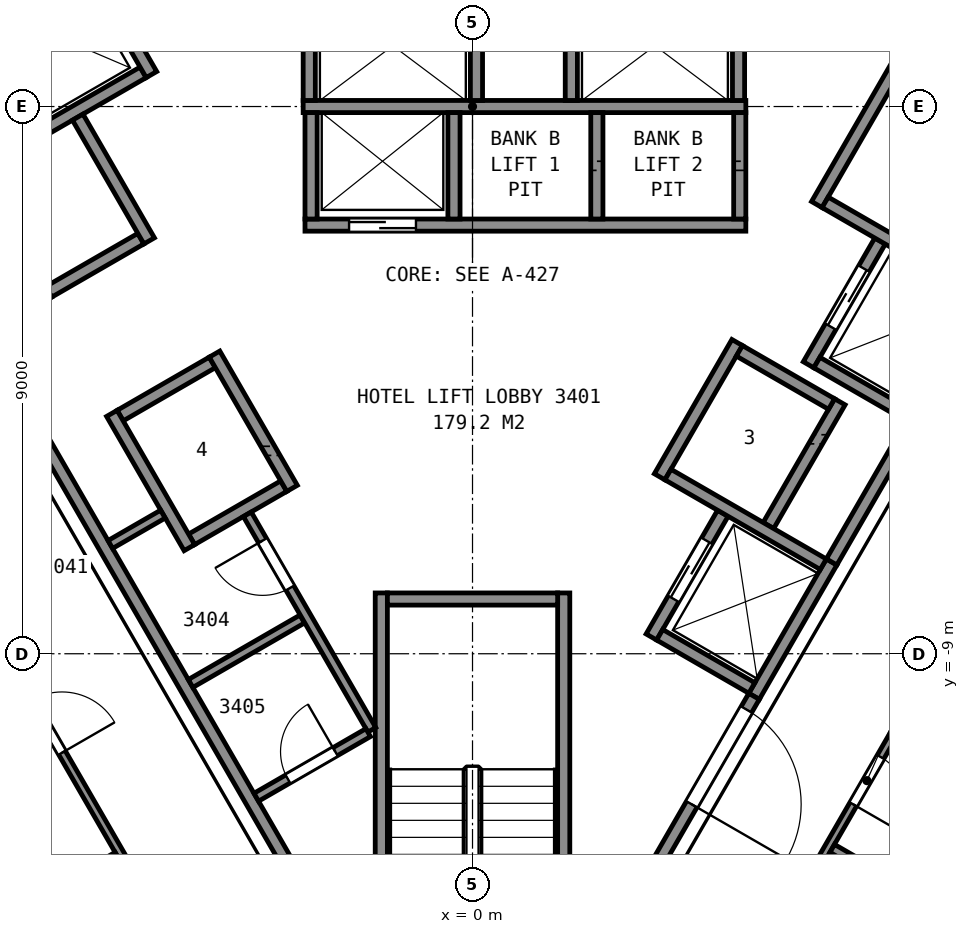
"""IFC4 building model, lengths in metres.
Left out: names, types, materials, properties, quantities, classifications, styles, units other than length and angle.
Written with IfcOpenShell. Run it as: python <this file> out.ifc"""

import sys

from ifc_helpers import new_model, si_unit, direction, frame, frame_2d, origin, place, context, subcontext, project, spatial, rectangle, extrude, element, fill, save


model = new_model("IFC4")
c1 = context("Model", 3, precision=1e-05, world=origin(), true_north=direction((0.0, 1.0)))
c2 = subcontext(c1, "Body", "Model", "MODEL_VIEW")
j1 = project(units=[si_unit("LENGTHUNIT", "METRE"), si_unit("PLANEANGLEUNIT", "RADIAN")], contexts=[c1])
p1 = place(None, origin())
s1 = spatial("IfcSite", under=j1, at=p1, CompositionType="ELEMENT")
p2 = place(p1, origin())
s2 = spatial("IfcBuilding", under=s1, at=p2, CompositionType="ELEMENT")
p3 = place(p2, frame((0.0, 0.0, 139.6)))
s3 = spatial("IfcBuildingStorey", under=s2, at=p3, CompositionType="ELEMENT", Elevation=139.6)
for number, where, z_axis, x_axis in (
    (1, (1.5, -8.0, 0.0), (0.0, 0.0, 1.0), (0.0, -1.0, 0.0)),
    (2, (-1.5, -8.0, 0.0), (0.0, 0.0, 1.0), (0.0, -1.0, 0.0)),
):
    element("IfcWall", number, at=place(p3, frame(where, z_axis=z_axis, x_axis=x_axis)), inside=s3, PredefinedType="PARTITIONING", context=c2, shape_type="SweptSolid", body=[
        extrude(rectangle(XDim=12.0, YDim=0.2, at=frame_2d((6.0, 0.0))), origin(), (0.0, 0.0, 1.0), 3.35),
    ])
p4 = place(p3, frame((-1.4, -8.1, 0.0), z_axis=(0.0, 0.0, 1.0), x_axis=(1.0, 0.0, 0.0)))
e3 = element("IfcWall", 3, at=p4, inside=s3, PredefinedType="PARTITIONING", context=c2, shape_type="SweptSolid", body=[
    extrude(rectangle(XDim=2.8, YDim=0.2, at=frame_2d((1.4, 0.0))), origin(), (0.0, 0.0, 1.0), 3.35),
])
p5 = place(p3, frame((-2.755, -1.95, 0.0), z_axis=(0.0, 0.0, 1.0), x_axis=(1.0, 0.0, 0.0)))
e4 = element("IfcWall", 4, at=p5, inside=s3, PredefinedType="PARTITIONING", context=c2, shape_type="SweptSolid", body=[
    extrude(rectangle(XDim=7.25, YDim=0.2, at=frame_2d((3.625, 0.0))), origin(), (0.0, 0.0, 1.0), 3.6),
])
p6 = place(p5, frame((0.725, 0.0, 0.0)))
e5 = element("IfcOpeningElement", 5, at=p6, cuts=e4, PredefinedType="OPENING", context=c2, shape_type="SweptSolid", body=[
    extrude(rectangle(XDim=1.1, YDim=2.1, at=frame_2d((0.55, 1.05))), frame((0.0, 0.11, 0.0), z_axis=(0.0, -1.0, 0.0), x_axis=(1.0, 0.0, 0.0)), (0.0, 0.0, 1.0), 0.22),
])
p7 = place(p3, frame((-2.785, 0.0, 0.0), z_axis=(0.0, 0.0, 1.0), x_axis=(1.0, 0.0, 0.0)))
e6 = element("IfcWall", 6, at=p7, inside=s3, PredefinedType="PARTITIONING", context=c2, shape_type="SweptSolid", body=[
    extrude(rectangle(XDim=7.28, YDim=0.2, at=frame_2d((3.64, 0.0))), origin(), (0.0, 0.0, 1.0), 3.6),
])
for number, where, z_axis, x_axis in (
    (7, (-4.62, -7.118, 0.0), (0.0, 0.0, 1.0), (0.866, 0.5, 0.0)),
    (8, (-5.795, -5.083, 0.0), (0.0, 0.0, 1.0), (0.866, 0.5, 0.0)),
    (9, (-6.97, -3.048, 0.0), (0.0, 0.0, 1.0), (0.866, 0.5, 0.0)),
):
    element("IfcWall", number, at=place(p3, frame(where, z_axis=z_axis, x_axis=x_axis)), inside=s3, PredefinedType="PARTITIONING", context=c2, shape_type="SweptSolid", body=[
        extrude(rectangle(XDim=1.75, YDim=0.2, at=frame_2d((0.875, 0.0))), origin(), (0.0, 0.0, 1.0), 3.6),
    ])
p8 = place(p3, frame((-8.145, -1.013, 0.0), z_axis=(0.0, 0.0, 1.0), x_axis=(0.866016494683, 0.500015430699, 0.0)))
e10 = element("IfcWall", 10, at=p8, inside=s3, PredefinedType="PARTITIONING", context=c2, shape_type="SweptSolid", body=[
    extrude(rectangle(XDim=3.15, YDim=0.2, at=frame_2d((1.575, 0.0))), origin(), (0.0, 0.0, 1.0), 3.6),
])
p9 = place(p3, frame((4.63, -9.7, 0.0), z_axis=(0.0, 0.0, 1.0), x_axis=(0.500062241894, 0.865989465428, 0.0)))
e11 = element("IfcWall", 11, at=p9, inside=s3, PredefinedType="PARTITIONING", context=c2, shape_type="SweptSolid", body=[
    extrude(rectangle(XDim=2.55, YDim=0.2, at=frame_2d((1.275, 0.0))), origin(), (0.0, 0.0, 1.0), 3.6),
])
p10 = place(p3, frame((4.866, -6.891, 0.0), z_axis=(0.0, 0.0, 1.0), x_axis=(0.500016218704, 0.866016039709, 0.0)))
e12 = element("IfcWall", 12, at=p10, inside=s3, PredefinedType="PARTITIONING", context=c2, shape_type="SweptSolid", body=[
    extrude(rectangle(XDim=2.35, YDim=0.2, at=frame_2d((1.175, 0.0))), origin(), (0.0, 0.0, 1.0), 3.6),
])
p11 = place(p3, frame((2.942, -8.725, 0.0), z_axis=(0.0, 0.0, 1.0), x_axis=(0.500016218704, 0.866016039709, 0.0)))
e13 = element("IfcWall", 13, at=p11, inside=s3, PredefinedType="PARTITIONING", context=c2, shape_type="SweptSolid", body=[
    extrude(rectangle(XDim=2.35, YDim=0.2, at=frame_2d((1.175, 0.0))), origin(), (0.0, 0.0, 1.0), 3.6),
])
p12 = place(p11, frame((0.725, 0.0, 0.0)))
e14 = element("IfcOpeningElement", 14, at=p12, cuts=e13, PredefinedType="OPENING", context=c2, shape_type="SweptSolid", body=[
    extrude(rectangle(XDim=1.1, YDim=2.1, at=frame_2d((0.55, 1.05))), frame((0.0, 0.11, 0.0), z_axis=(0.0, -1.0, 0.0), x_axis=(1.0, 0.0, 0.0)), (0.0, 0.0, 1.0), 0.22),
])
p13 = place(p3, frame((5.527, -4.247, 0.0), z_axis=(0.0, 0.0, 1.0), x_axis=(0.499938297808, 0.866061024631, 0.0)))
e15 = element("IfcWall", 15, at=p13, inside=s3, PredefinedType="PARTITIONING", context=c2, shape_type="SweptSolid", body=[
    extrude(rectangle(XDim=2.35, YDim=0.2, at=frame_2d((1.175, 0.0))), origin(), (0.0, 0.0, 1.0), 3.6),
])
p14 = place(p13, frame((0.725, 0.0, 0.0)))
e16 = element("IfcOpeningElement", 16, at=p14, cuts=e15, PredefinedType="OPENING", context=c2, shape_type="SweptSolid", body=[
    extrude(rectangle(XDim=1.1, YDim=2.1, at=frame_2d((0.55, 1.05))), frame((0.0, 0.11, 0.0), z_axis=(0.0, -1.0, 0.0), x_axis=(1.0, 0.0, 0.0)), (0.0, 0.0, 1.0), 0.22),
])
p15 = place(p3, frame((3.077, -6.09, 0.0), z_axis=(0.0, 0.0, 1.0), x_axis=(0.500062241894, 0.865989465428, 0.0)))
e17 = element("IfcWall", 17, at=p15, inside=s3, PredefinedType="PARTITIONING", context=c2, shape_type="SweptSolid", body=[
    extrude(rectangle(XDim=2.55, YDim=0.2, at=frame_2d((1.275, 0.0))), origin(), (0.0, 0.0, 1.0), 3.6),
])
p16 = place(p3, frame((5.663, -1.612, 0.0), z_axis=(0.0, 0.0, 1.0), x_axis=(0.49998122708, 0.866036242063, 0.0)))
e18 = element("IfcWall", 18, at=p16, inside=s3, PredefinedType="PARTITIONING", context=c2, shape_type="SweptSolid", body=[
    extrude(rectangle(XDim=4.9, YDim=0.2, at=frame_2d((2.45, 0.0))), origin(), (0.0, 0.0, 1.0), 3.6),
])
p17 = place(p3, frame((4.395, -1.85, 0.0), z_axis=(0.0, 0.0, 1.0), x_axis=(0.0, 1.0, 0.0)))
e19 = element("IfcWall", 19, at=p17, inside=s3, PredefinedType="PARTITIONING", context=c2, shape_type="SweptSolid", body=[
    extrude(rectangle(XDim=1.75, YDim=0.2, at=frame_2d((0.875, 0.0))), origin(), (0.0, 0.0, 1.0), 3.6),
])
p18 = place(p3, frame((4.375, 0.1, 0.0), z_axis=(0.0, 0.0, 1.0), x_axis=(0.0, 1.0, 0.0)))
e20 = element("IfcWall", 20, at=p18, inside=s3, PredefinedType="PARTITIONING", context=c2, shape_type="SweptSolid", body=[
    extrude(rectangle(XDim=1.95, YDim=0.2, at=frame_2d((0.975, 0.0))), origin(), (0.0, 0.0, 1.0), 3.6),
])
p19 = place(p3, frame((2.045, -1.85, 0.0), z_axis=(0.0, 0.0, 1.0), x_axis=(0.0, 1.0, 0.0)))
e21 = element("IfcWall", 21, at=p19, inside=s3, PredefinedType="PARTITIONING", context=c2, shape_type="SweptSolid", body=[
    extrude(rectangle(XDim=1.75, YDim=0.2, at=frame_2d((0.875, 0.0))), origin(), (0.0, 0.0, 1.0), 3.6),
])
for number, where, z_axis, x_axis in (
    (22, (1.625, 0.1, 0.0), (0.0, 0.0, 1.0), (0.0, 1.0, 0.0)),
    (23, (0.065, 0.1, 0.0), (0.0, 0.0, 1.0), (0.0, 1.0, 0.0)),
):
    element("IfcWall", number, at=place(p3, frame(where, z_axis=z_axis, x_axis=x_axis)), inside=s3, PredefinedType="PARTITIONING", context=c2, shape_type="SweptSolid", body=[
        extrude(rectangle(XDim=1.95, YDim=0.2, at=frame_2d((0.975, 0.0))), origin(), (0.0, 0.0, 1.0), 3.6),
    ])
for number, where, z_axis, x_axis in (
    (24, (-0.305, -1.85, 0.0), (0.0, 0.0, 1.0), (0.0, 1.0, 0.0)),
    (25, (-2.655, -1.85, 0.0), (0.0, 0.0, 1.0), (0.0, 1.0, 0.0)),
):
    element("IfcWall", number, at=place(p3, frame(where, z_axis=z_axis, x_axis=x_axis)), inside=s3, PredefinedType="PARTITIONING", context=c2, shape_type="SweptSolid", body=[
        extrude(rectangle(XDim=1.75, YDim=0.2, at=frame_2d((0.875, 0.0))), origin(), (0.0, 0.0, 1.0), 3.6),
    ])
p20 = place(p3, frame((-2.685, 0.1, 0.0), z_axis=(0.0, 0.0, 1.0), x_axis=(0.0, 1.0, 0.0)))
e26 = element("IfcWall", 26, at=p20, inside=s3, PredefinedType="PARTITIONING", context=c2, shape_type="SweptSolid", body=[
    extrude(rectangle(XDim=1.95, YDim=0.2, at=frame_2d((0.975, 0.0))), origin(), (0.0, 0.0, 1.0), 3.6),
])
p21 = place(p3, frame((-5.28, 0.525, 0.0), z_axis=(0.0, 0.0, 1.0), x_axis=(-0.500037662692, 0.866003658127, 0.0)))
e27 = element("IfcWall", 27, at=p21, inside=s3, PredefinedType="PARTITIONING", context=c2, shape_type="SweptSolid", body=[
    extrude(rectangle(XDim=2.95, YDim=0.2, at=frame_2d((1.475, 0.0))), origin(), (0.0, 0.0, 1.0), 3.6),
])
p22 = place(p21, frame((0.925, 0.0, 0.0)))
e28 = element("IfcOpeningElement", 28, at=p22, cuts=e27, PredefinedType="OPENING", context=c2, shape_type="SweptSolid", body=[
    extrude(rectangle(XDim=1.1, YDim=2.1, at=frame_2d((0.55, 1.05))), frame((0.0, 0.11, 0.0), z_axis=(0.0, -1.0, 0.0), x_axis=(1.0, 0.0, 0.0)), (0.0, 0.0, 1.0), 0.22),
])
p23 = place(p3, frame((-2.968, -6.28, 0.0), z_axis=(0.0, 0.0, 1.0), x_axis=(-0.499990435942, 0.866030925526, 0.0)))
e29 = element("IfcWall", 29, at=p23, inside=s3, PredefinedType="PARTITIONING", context=c2, shape_type="SweptSolid", body=[
    extrude(rectangle(XDim=2.55, YDim=0.2, at=frame_2d((1.275, 0.0))), origin(), (0.0, 0.0, 1.0), 3.6),
])
p24 = place(p3, frame((-5.318, -2.21, 0.0), z_axis=(0.0, 0.0, 1.0), x_axis=(-0.499938297808, 0.866061024631, 0.0)))
e30 = element("IfcWall", 30, at=p24, inside=s3, PredefinedType="PARTITIONING", context=c2, shape_type="SweptSolid", body=[
    extrude(rectangle(XDim=2.35, YDim=0.2, at=frame_2d((1.175, 0.0))), origin(), (0.0, 0.0, 1.0), 3.6),
])
p25 = place(p3, frame((-4.656, -7.255, 0.0), z_axis=(0.0, 0.0, 1.0), x_axis=(-0.499990435942, 0.866030925526, 0.0)))
e31 = element("IfcWall", 31, at=p25, inside=s3, PredefinedType="PARTITIONING", context=c2, shape_type="SweptSolid", body=[
    extrude(rectangle(XDim=2.55, YDim=0.2, at=frame_2d((1.275, 0.0))), origin(), (0.0, 0.0, 1.0), 3.6),
])
p26 = place(p3, frame((8.354, -3.051, 0.0), z_axis=(0.0, 0.0, 1.0), x_axis=(-0.866060182126, 0.499939757307, 0.0)))
e32 = element("IfcWall", 32, at=p26, inside=s3, PredefinedType="PARTITIONING", context=c2, shape_type="SweptSolid", body=[
    extrude(rectangle(XDim=2.95, YDim=0.2, at=frame_2d((1.475, 0.0))), origin(), (0.0, 0.0, 1.0), 3.6),
])
p27 = place(p3, frame((7.179, -5.086, 0.0), z_axis=(0.0, 0.0, 1.0), x_axis=(-0.866036909293, 0.499980071345, 0.0)))
e33 = element("IfcWall", 33, at=p27, inside=s3, PredefinedType="PARTITIONING", context=c2, shape_type="SweptSolid", body=[
    extrude(rectangle(XDim=1.75, YDim=0.2, at=frame_2d((0.875, 0.0))), origin(), (0.0, 0.0, 1.0), 3.6),
])
p28 = place(p3, frame((5.905, -4.893, 0.0), z_axis=(0.0, 0.0, 1.0), x_axis=(-0.866002029911, 0.500040482552, 0.0)))
e34 = element("IfcWall", 34, at=p28, inside=s3, PredefinedType="PARTITIONING", context=c2, shape_type="SweptSolid", body=[
    extrude(rectangle(XDim=1.75, YDim=0.2, at=frame_2d((0.875, 0.0))), origin(), (0.0, 0.0, 1.0), 3.6),
])
p29 = place(p3, frame((5.769, -7.528, 0.0), z_axis=(0.0, 0.0, 1.0), x_axis=(-0.866003658127, 0.500037662692, 0.0)))
e35 = element("IfcWall", 35, at=p29, inside=s3, PredefinedType="PARTITIONING", context=c2, shape_type="SweptSolid", body=[
    extrude(rectangle(XDim=2.95, YDim=0.2, at=frame_2d((1.475, 0.0))), origin(), (0.0, 0.0, 1.0), 3.6),
])
p30 = place(p3, frame((4.594, -9.563, 0.0), z_axis=(0.0, 0.0, 1.0), x_axis=(-0.866036909293, 0.499980071345, 0.0)))
e36 = element("IfcWall", 36, at=p30, inside=s3, PredefinedType="PARTITIONING", context=c2, shape_type="SweptSolid", body=[
    extrude(rectangle(XDim=1.75, YDim=0.2, at=frame_2d((0.875, 0.0))), origin(), (0.0, 0.0, 1.0), 3.6),
])
p31 = place(p3, frame((-13.664, 5.946, 0.0), z_axis=(0.0, 0.0, 1.0), x_axis=(0.499994327219, -0.866028678941, 0.0)))
e37 = element("IfcWall", 37, at=p31, inside=s3, PredefinedType="PARTITIONING", context=c2, shape_type="SweptSolid", body=[
    extrude(rectangle(XDim=23.968, YDim=0.2, at=frame_2d((11.984, 0.0))), origin(), (0.0, 0.0, 1.0), 3.35),
])
p32 = place(p3, frame((-5.956, -7.203, 0.0), z_axis=(0.0, 0.0, 1.0), x_axis=(0.866006330792, 0.500033033937, 0.0)))
e38 = element("IfcWall", 38, at=p32, inside=s3, PredefinedType="PARTITIONING", context=c2, shape_type="SweptSolid", body=[
    extrude(rectangle(XDim=0.998, YDim=0.15, at=frame_2d((0.499, 0.0))), origin(), (0.0, 0.0, 1.0), 3.35),
])
p33 = place(p3, frame((-4.636, -9.489, 0.0), z_axis=(0.0, 0.0, 1.0), x_axis=(0.866037937328, 0.499978290637, 0.0)))
e39 = element("IfcWall", 39, at=p33, inside=s3, PredefinedType="PARTITIONING", context=c2, shape_type="SweptSolid", body=[
    extrude(rectangle(XDim=2.12, YDim=0.15, at=frame_2d((1.06, 0.0))), origin(), (0.0, 0.0, 1.0), 3.35),
])
p34 = place(p3, frame((-1.656, -10.251, 0.0), z_axis=(0.0, 0.0, 1.0), x_axis=(-0.500116590316, 0.865958079869, 0.0)))
e40 = element("IfcWall", 40, at=p34, inside=s3, PredefinedType="PARTITIONING", context=c2, shape_type="SweptSolid", body=[
    extrude(rectangle(XDim=4.093, YDim=0.15, at=frame_2d((2.046, 0.0))), origin(), (0.0, 0.0, 1.0), 3.35),
])
p35 = place(p34, frame((2.693, 0.0, 0.0)))
e41 = element("IfcOpeningElement", 41, at=p35, cuts=e40, PredefinedType="OPENING", context=c2, shape_type="SweptSolid", body=[
    extrude(rectangle(XDim=0.9, YDim=2.1, at=frame_2d((0.45, 1.05))), frame((0.0, 0.085, 0.0), z_axis=(0.0, -1.0, 0.0), x_axis=(1.0, 0.0, 0.0)), (0.0, 0.0, 1.0), 0.17),
])
p36 = place(p3, frame((-3.556, -11.36, 0.0), z_axis=(0.0, 0.0, 1.0), x_axis=(0.866028703517, 0.499994284652, 0.0)))
e42 = element("IfcWall", 42, at=p36, inside=s3, PredefinedType="PARTITIONING", context=c2, shape_type="SweptSolid", body=[
    extrude(rectangle(XDim=2.125, YDim=0.15, at=frame_2d((1.062, 0.0))), origin(), (0.0, 0.0, 1.0), 3.35),
])
p37 = place(p36, frame((0.6, 0.0, 0.0)))
e43 = element("IfcOpeningElement", 43, at=p37, cuts=e42, PredefinedType="OPENING", context=c2, shape_type="SweptSolid", body=[
    extrude(rectangle(XDim=0.9, YDim=2.1, at=frame_2d((0.45, 1.05))), frame((0.0, 0.085, 0.0), z_axis=(0.0, -1.0, 0.0), x_axis=(1.0, 0.0, 0.0)), (0.0, 0.0, 1.0), 0.17),
])
p38 = place(p3, frame((1.677, -14.815, 0.0), z_axis=(0.0, 0.0, 1.0), x_axis=(0.49999445743, 0.866028603765, 0.0)))
e44 = element("IfcWall", 44, at=p38, inside=s3, PredefinedType="PARTITIONING", context=c2, shape_type="SweptSolid", body=[
    extrude(rectangle(XDim=5.905, YDim=0.2, at=frame_2d((2.952, 0.0))), origin(), (0.0, 0.0, 1.0), 3.35),
])
p39 = place(p38, frame((3.855, 0.0, 0.0)))
e45 = element("IfcOpeningElement", 45, at=p39, cuts=e44, PredefinedType="OPENING", context=c2, shape_type="SweptSolid", body=[
    extrude(rectangle(XDim=1.8, YDim=2.1, at=frame_2d((0.9, 1.05))), frame((0.0, 0.11, 0.0), z_axis=(0.0, -1.0, 0.0), x_axis=(1.0, 0.0, 0.0)), (0.0, 0.0, 1.0), 0.22),
])
p40 = place(p3, frame((5.906, -7.49, 0.0), z_axis=(0.0, 0.0, 1.0), x_axis=(0.500252727967, 0.865879442048, 0.0)))
e46 = element("IfcWall", 46, at=p40, inside=s3, PredefinedType="PARTITIONING", context=c2, shape_type="SweptSolid", body=[
    extrude(rectangle(XDim=2.617, YDim=0.2, at=frame_2d((1.309, 0.0))), origin(), (0.0, 0.0, 1.0), 3.35),
])
p41 = place(p3, frame((-3.756, -15.816, 0.0), z_axis=(0.0, 0.0, 1.0), x_axis=(-0.499992829944, 0.866029543379, 0.0)))
e47 = element("IfcWall", 47, at=p41, inside=s3, PredefinedType="PARTITIONING", context=c2, shape_type="SweptSolid", body=[
    extrude(rectangle(XDim=24.413, YDim=0.125, at=frame_2d((12.207, 0.0))), origin(), (0.0, 0.0, 1.0), 2.262),
])
p42 = place(p41, frame((20.478, 0.0, 0.0)))
e48 = element("IfcOpeningElement", 48, at=p42, cuts=e47, PredefinedType="OPENING", context=c2, shape_type="SweptSolid", body=[
    extrude(rectangle(XDim=1.0, YDim=2.1, at=frame_2d((0.5, 1.05))), frame((0.0, 0.073, 0.0), z_axis=(0.0, -1.0, 0.0), x_axis=(1.0, 0.0, 0.0)), (0.0, 0.0, 1.0), 0.145),
])
p43 = place(p41, frame((5.99, 0.0, 0.0)))
e49 = element("IfcOpeningElement", 49, at=p43, cuts=e47, PredefinedType="OPENING", context=c2, shape_type="SweptSolid", body=[
    extrude(rectangle(XDim=1.0, YDim=2.1, at=frame_2d((0.5, 1.05))), frame((0.0, 0.073, 0.0), z_axis=(0.0, -1.0, 0.0), x_axis=(1.0, 0.0, 0.0)), (0.0, 0.0, 1.0), 0.145),
])
p44 = place(p41, frame((1.561, 0.0, 0.0)))
e50 = element("IfcOpeningElement", 50, at=p44, cuts=e47, PredefinedType="OPENING", context=c2, shape_type="SweptSolid", body=[
    extrude(rectangle(XDim=1.0, YDim=2.1, at=frame_2d((0.5, 1.05))), frame((0.0, 0.073, 0.0), z_axis=(0.0, -1.0, 0.0), x_axis=(1.0, 0.0, 0.0)), (0.0, 0.0, 1.0), 0.145),
])
p45 = place(p3, frame((-13.281, -16.627, 0.0), z_axis=(0.0, 0.0, 1.0), x_axis=(0.866036528751, 0.499980730498, 0.0)))
e51 = element("IfcWall", 51, at=p45, inside=s3, PredefinedType="PARTITIONING", context=c2, shape_type="SweptSolid", body=[
    extrude(rectangle(XDim=8.592, YDim=0.15, at=frame_2d((4.296, 0.0))), origin(), (0.0, 0.0, 1.0), 2.262),
])
p46 = place(p3, frame((15.962, 5.326, 0.0), z_axis=(0.0, 0.0, 1.0), x_axis=(-0.499992829944, -0.866029543379, 0.0)))
e52 = element("IfcWall", 52, at=p46, inside=s3, PredefinedType="PARTITIONING", context=c2, shape_type="SweptSolid", body=[
    extrude(rectangle(XDim=24.413, YDim=0.125, at=frame_2d((12.207, 0.0))), origin(), (0.0, 0.0, 1.0), 2.262),
])
p47 = place(p46, frame((21.258, 0.0, 0.0)))
e53 = element("IfcOpeningElement", 53, at=p47, cuts=e52, PredefinedType="OPENING", context=c2, shape_type="SweptSolid", body=[
    extrude(rectangle(XDim=0.9, YDim=2.1, at=frame_2d((0.45, 1.05))), frame((0.0, 0.073, 0.0), z_axis=(0.0, -1.0, 0.0), x_axis=(1.0, 0.0, 0.0)), (0.0, 0.0, 1.0), 0.145),
])
p48 = place(p46, frame((18.502, 0.0, 0.0)))
e54 = element("IfcOpeningElement", 54, at=p48, cuts=e52, PredefinedType="OPENING", context=c2, shape_type="SweptSolid", body=[
    extrude(rectangle(XDim=0.9, YDim=2.1, at=frame_2d((0.45, 1.05))), frame((0.0, 0.073, 0.0), z_axis=(0.0, -1.0, 0.0), x_axis=(1.0, 0.0, 0.0)), (0.0, 0.0, 1.0), 0.145),
])
p49 = place(p46, frame((11.799, 0.0, 0.0)))
e55 = element("IfcOpeningElement", 55, at=p49, cuts=e52, PredefinedType="OPENING", context=c2, shape_type="SweptSolid", body=[
    extrude(rectangle(XDim=0.9, YDim=2.1, at=frame_2d((0.45, 1.05))), frame((0.0, 0.073, 0.0), z_axis=(0.0, -1.0, 0.0), x_axis=(1.0, 0.0, 0.0)), (0.0, 0.0, 1.0), 0.145),
])
p50 = place(p46, frame((9.043, 0.0, 0.0)))
e56 = element("IfcOpeningElement", 56, at=p50, cuts=e52, PredefinedType="OPENING", context=c2, shape_type="SweptSolid", body=[
    extrude(rectangle(XDim=0.9, YDim=2.1, at=frame_2d((0.45, 1.05))), frame((0.0, 0.073, 0.0), z_axis=(0.0, -1.0, 0.0), x_axis=(1.0, 0.0, 0.0)), (0.0, 0.0, 1.0), 0.145),
])
p51 = place(p46, frame((1.99, 0.0, 0.0)))
e57 = element("IfcOpeningElement", 57, at=p51, cuts=e52, PredefinedType="OPENING", context=c2, shape_type="SweptSolid", body=[
    extrude(rectangle(XDim=0.9, YDim=2.1, at=frame_2d((0.45, 1.05))), frame((0.0, 0.073, 0.0), z_axis=(0.0, -1.0, 0.0), x_axis=(1.0, 0.0, 0.0)), (0.0, 0.0, 1.0), 0.145),
])
p52 = place(p3, frame((5.916, -12.201, 0.0), z_axis=(0.0, 0.0, 1.0), x_axis=(0.865995804368, -0.50005126419, 0.0)))
e58 = element("IfcWall", 58, at=p52, inside=s3, PredefinedType="PARTITIONING", context=c2, shape_type="SweptSolid", body=[
    extrude(rectangle(XDim=8.591, YDim=0.15, at=frame_2d((4.295, 0.0))), origin(), (0.0, 0.0, 1.0), 2.262),
])
p53 = place(p6, origin())
e59 = element("IfcDoor", 59, at=p53, inside=s3, OperationType="SLIDING_TO_RIGHT", PredefinedType="DOOR", context=c2, shape_type="SweptSolid", body=[
    extrude(rectangle(XDim=1.1, YDim=2.1, at=frame_2d((0.55, 1.05))), frame((0.0, 0.025, 0.0), z_axis=(0.0, -1.0, 0.0), x_axis=(1.0, 0.0, 0.0)), (0.0, 0.0, 1.0), 0.05),
])
fill(e5, e59)
p54 = place(p12, origin())
e60 = element("IfcDoor", 60, at=p54, inside=s3, OperationType="SLIDING_TO_RIGHT", PredefinedType="DOOR", context=c2, shape_type="SweptSolid", body=[
    extrude(rectangle(XDim=1.1, YDim=2.1, at=frame_2d((0.55, 1.05))), frame((0.0, 0.025, 0.0), z_axis=(0.0, -1.0, 0.0), x_axis=(1.0, 0.0, 0.0)), (0.0, 0.0, 1.0), 0.05),
])
fill(e14, e60)
p55 = place(p14, origin())
e61 = element("IfcDoor", 61, at=p55, inside=s3, OperationType="SLIDING_TO_LEFT", PredefinedType="DOOR", context=c2, shape_type="SweptSolid", body=[
    extrude(rectangle(XDim=1.1, YDim=2.1, at=frame_2d((0.55, 1.05))), frame((0.0, 0.025, 0.0), z_axis=(0.0, -1.0, 0.0), x_axis=(1.0, 0.0, 0.0)), (0.0, 0.0, 1.0), 0.05),
])
fill(e16, e61)
p56 = place(p35, origin())
e62 = element("IfcDoor", 62, at=p56, inside=s3, OperationType="SINGLE_SWING_RIGHT", PredefinedType="DOOR", context=c2, shape_type="SweptSolid", body=[
    extrude(rectangle(XDim=0.9, YDim=2.1, at=frame_2d((0.45, 1.05))), frame((0.0, 0.025, 0.0), z_axis=(0.0, -1.0, 0.0), x_axis=(1.0, 0.0, 0.0)), (0.0, 0.0, 1.0), 0.05),
])
fill(e41, e62)
p57 = place(p37, origin())
e63 = element("IfcDoor", 63, at=p57, inside=s3, OperationType="SINGLE_SWING_RIGHT", PredefinedType="DOOR", context=c2, shape_type="SweptSolid", body=[
    extrude(rectangle(XDim=0.9, YDim=2.1, at=frame_2d((0.45, 1.05))), frame((0.0, 0.025, 0.0), z_axis=(0.0, -1.0, 0.0), x_axis=(1.0, 0.0, 0.0)), (0.0, 0.0, 1.0), 0.05),
])
fill(e43, e63)
p58 = place(p39, origin())
e64 = element("IfcDoor", 64, at=p58, inside=s3, OperationType="DOUBLE_DOOR_SINGLE_SWING", PredefinedType="DOOR", context=c2, shape_type="SweptSolid", body=[
    extrude(rectangle(XDim=1.8, YDim=2.1, at=frame_2d((0.9, 1.05))), frame((0.0, 0.025, 0.0), z_axis=(0.0, -1.0, 0.0), x_axis=(1.0, 0.0, 0.0)), (0.0, 0.0, 1.0), 0.05),
])
fill(e45, e64)
p59 = place(p43, origin())
e65 = element("IfcDoor", 65, at=p59, inside=s3, OperationType="SINGLE_SWING_LEFT", PredefinedType="DOOR", context=c2, shape_type="SweptSolid", body=[
    extrude(rectangle(XDim=1.0, YDim=2.1, at=frame_2d((0.5, 1.05))), frame((0.0, 0.025, 0.0), z_axis=(0.0, -1.0, 0.0), x_axis=(1.0, 0.0, 0.0)), (0.0, 0.0, 1.0), 0.05),
])
fill(e49, e65)
p60 = place(p48, origin())
e66 = element("IfcDoor", 66, at=p60, inside=s3, OperationType="SINGLE_SWING_RIGHT", PredefinedType="DOOR", context=c2, shape_type="SweptSolid", body=[
    extrude(rectangle(XDim=0.9, YDim=2.1, at=frame_2d((0.45, 1.05))), frame((0.0, 0.025, 0.0), z_axis=(0.0, -1.0, 0.0), x_axis=(1.0, 0.0, 0.0)), (0.0, 0.0, 1.0), 0.05),
])
fill(e54, e66)
save(model, sys.argv[1])
